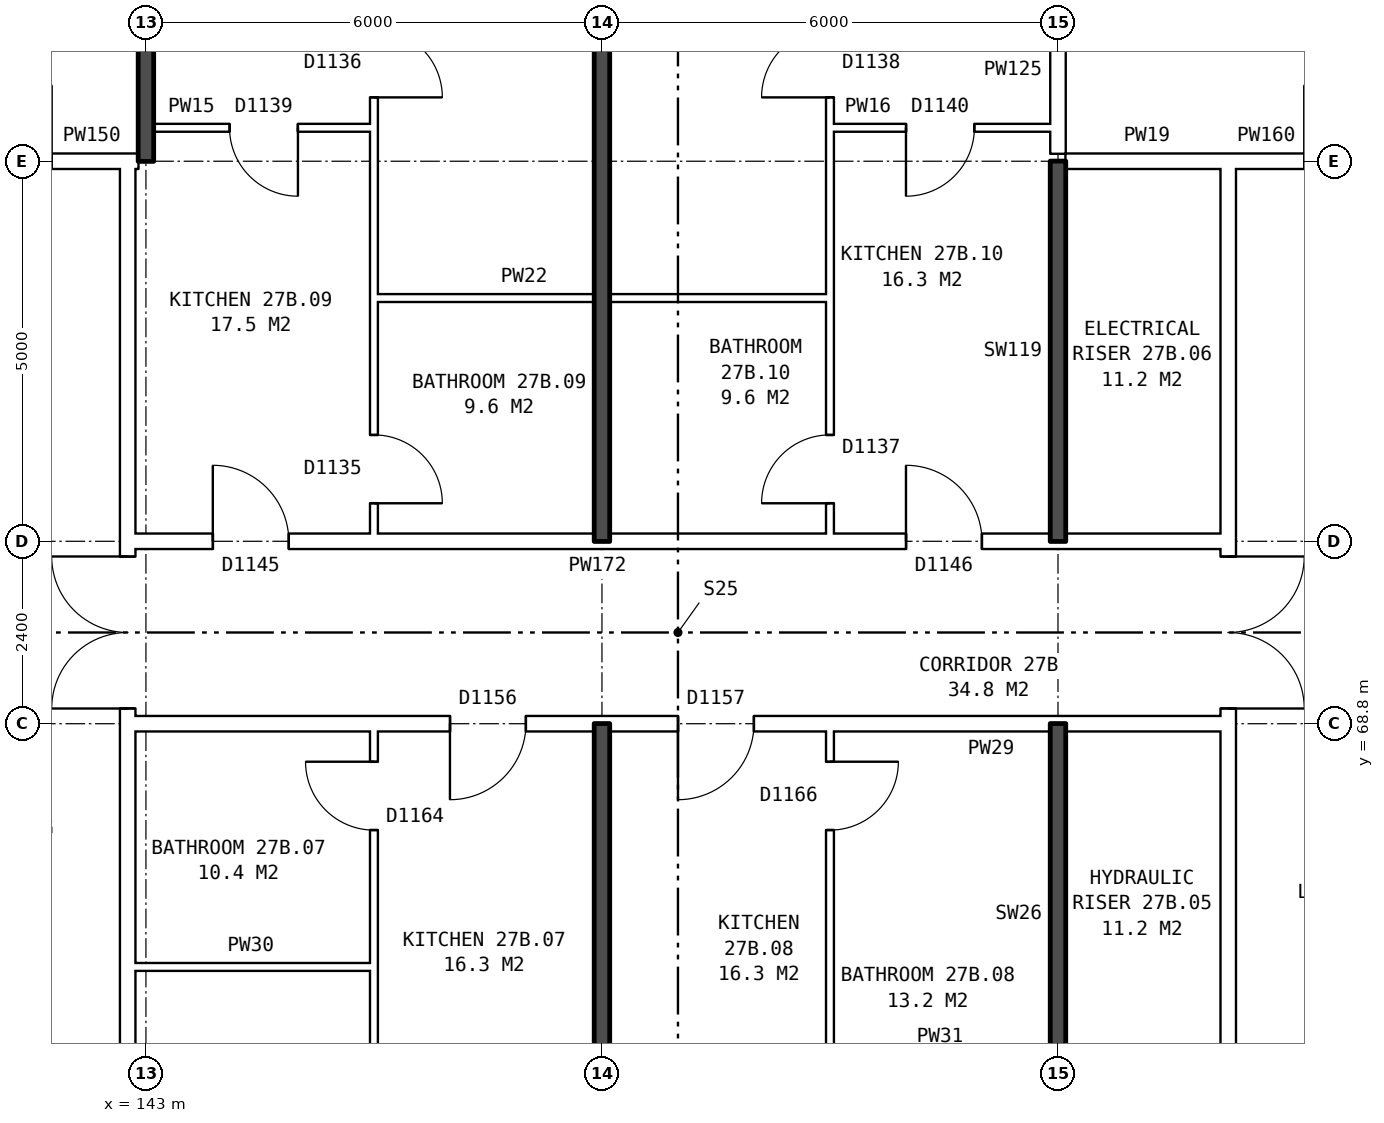
"""IFC4 building model, lengths in metres.
Left out: names, types, materials, properties, quantities, classifications, styles, units other than length and angle.
Written with IfcOpenShell. Run it as: python <this file> out.ifc"""

import sys

from ifc_helpers import new_model, si_unit, direction, frame, frame_2d, origin, place, context, subcontext, project, spatial, rectangle, extrude, element, fill, save


model = new_model("IFC4")
c1 = context("Model", 3, precision=1e-05, world=origin(), true_north=direction((0.0, 1.0)))
c2 = subcontext(c1, "Body", "Model", "MODEL_VIEW")
j1 = project(units=[si_unit("LENGTHUNIT", "METRE"), si_unit("PLANEANGLEUNIT", "RADIAN")], contexts=[c1])
p1 = place(None, origin())
s1 = spatial("IfcSite", under=j1, at=p1, CompositionType="ELEMENT")
p2 = place(p1, origin())
s2 = spatial("IfcBuilding", under=s1, at=p2, CompositionType="ELEMENT")
p3 = place(p2, frame((0.0, 0.0, 99.5)))
s3 = spatial("IfcBuildingStorey", under=s2, at=p3, CompositionType="ELEMENT", Elevation=99.5)
p4 = place(p3, frame((142.76, 63.9, 0.0), z_axis=(0.0, 0.0, 1.0), x_axis=(0.0, 1.0, 0.0)))
e1 = element("IfcWall", 1, at=p4, inside=s3, PredefinedType="PARTITIONING", context=c2, shape_type="SweptSolid", body=[
    extrude(rectangle(XDim=12.2, YDim=0.2, at=frame_2d((6.1, 0.0))), origin(), (0.0, 0.0, 1.0), 2.85),
])
p5 = place(p4, frame((5.1, 0.0, 0.0)))
e2 = element("IfcOpeningElement", 2, at=p5, cuts=e1, PredefinedType="OPENING", context=c2, shape_type="SweptSolid", body=[
    extrude(rectangle(XDim=2.0, YDim=2.1, at=frame_2d((1.0, 1.05))), frame((0.0, 0.11, 0.0), z_axis=(0.0, -1.0, 0.0), x_axis=(1.0, 0.0, 0.0)), (0.0, 0.0, 1.0), 0.22),
])
p6 = place(p3, frame((157.24, 63.9, 0.0), z_axis=(0.0, 0.0, 1.0), x_axis=(0.0, 1.0, 0.0)))
e3 = element("IfcWall", 3, at=p6, inside=s3, PredefinedType="PARTITIONING", context=c2, shape_type="SweptSolid", body=[
    extrude(rectangle(XDim=12.2, YDim=0.2, at=frame_2d((6.1, 0.0))), origin(), (0.0, 0.0, 1.0), 2.85),
])
p7 = place(p6, frame((5.1, 0.0, 0.0)))
e4 = element("IfcOpeningElement", 4, at=p7, cuts=e3, PredefinedType="OPENING", context=c2, shape_type="SweptSolid", body=[
    extrude(rectangle(XDim=2.0, YDim=2.1, at=frame_2d((1.0, 1.05))), frame((0.0, 0.11, 0.0), z_axis=(0.0, -1.0, 0.0), x_axis=(1.0, 0.0, 0.0)), (0.0, 0.0, 1.0), 0.22),
])
p8 = place(p3, frame((142.76, 65.6, 0.0), z_axis=(0.0, 0.0, 1.0), x_axis=(1.0, 0.0, 0.0)))
e5 = element("IfcWall", 5, at=p8, inside=s3, PredefinedType="PARTITIONING", context=c2, shape_type="SweptSolid", body=[
    extrude(rectangle(XDim=3.24, YDim=0.1, at=frame_2d((1.62, 0.0))), origin(), (0.0, 0.0, 1.0), 2.85),
])
p9 = place(p3, frame((142.76, 68.8, 0.0), z_axis=(0.0, 0.0, 1.0), x_axis=(1.0, 0.0, 0.0)))
e6 = element("IfcWall", 6, at=p9, inside=s3, PredefinedType="PARTITIONING", context=c2, shape_type="SweptSolid", body=[
    extrude(rectangle(XDim=14.48, YDim=0.2, at=frame_2d((7.24, 0.0))), origin(), (0.0, 0.0, 1.0), 2.85),
])
p10 = place(p9, frame((4.24, 0.0, 0.0)))
e7 = element("IfcOpeningElement", 7, at=p10, cuts=e6, PredefinedType="OPENING", context=c2, shape_type="SweptSolid", body=[
    extrude(rectangle(XDim=1.0, YDim=2.1, at=frame_2d((0.5, 1.05))), frame((0.0, 0.11, 0.0), z_axis=(0.0, -1.0, 0.0), x_axis=(1.0, 0.0, 0.0)), (0.0, 0.0, 1.0), 0.22),
])
p11 = place(p9, frame((7.24, 0.0, 0.0)))
e8 = element("IfcOpeningElement", 8, at=p11, cuts=e6, PredefinedType="OPENING", context=c2, shape_type="SweptSolid", body=[
    extrude(rectangle(XDim=1.0, YDim=2.1, at=frame_2d((0.5, 1.05))), frame((0.0, 0.11, 0.0), z_axis=(0.0, -1.0, 0.0), x_axis=(1.0, 0.0, 0.0)), (0.0, 0.0, 1.0), 0.22),
])
p12 = place(p3, frame((142.76, 71.2, 0.0), z_axis=(0.0, 0.0, 1.0), x_axis=(1.0, 0.0, 0.0)))
e9 = element("IfcWall", 9, at=p12, inside=s3, PredefinedType="PARTITIONING", context=c2, shape_type="SweptSolid", body=[
    extrude(rectangle(XDim=14.48, YDim=0.2, at=frame_2d((7.24, 0.0))), origin(), (0.0, 0.0, 1.0), 2.85),
])
p13 = place(p12, frame((1.12, 0.0, 0.0)))
e10 = element("IfcOpeningElement", 10, at=p13, cuts=e9, PredefinedType="OPENING", context=c2, shape_type="SweptSolid", body=[
    extrude(rectangle(XDim=1.0, YDim=2.1, at=frame_2d((0.5, 1.05))), frame((0.0, 0.11, 0.0), z_axis=(0.0, -1.0, 0.0), x_axis=(1.0, 0.0, 0.0)), (0.0, 0.0, 1.0), 0.22),
])
p14 = place(p12, frame((10.24, 0.0, 0.0)))
e11 = element("IfcOpeningElement", 11, at=p14, cuts=e9, PredefinedType="OPENING", context=c2, shape_type="SweptSolid", body=[
    extrude(rectangle(XDim=1.0, YDim=2.1, at=frame_2d((0.5, 1.05))), frame((0.0, 0.11, 0.0), z_axis=(0.0, -1.0, 0.0), x_axis=(1.0, 0.0, 0.0)), (0.0, 0.0, 1.0), 0.22),
])
p15 = place(p3, frame((146.0, 74.4, 0.0), z_axis=(0.0, 0.0, 1.0), x_axis=(1.0, 0.0, 0.0)))
e12 = element("IfcWall", 12, at=p15, inside=s3, PredefinedType="PARTITIONING", context=c2, shape_type="SweptSolid", body=[
    extrude(rectangle(XDim=6.0, YDim=0.1, at=frame_2d((3.0, 0.0))), origin(), (0.0, 0.0, 1.0), 2.85),
])
p16 = place(p3, frame((139.76, 76.2, 0.0), z_axis=(0.0, 0.0, 1.0), x_axis=(1.0, 0.0, 0.0)))
e13 = element("IfcWall", 13, at=p16, inside=s3, PredefinedType="PARTITIONING", context=c2, shape_type="SweptSolid", body=[
    extrude(rectangle(XDim=3.0, YDim=0.2, at=frame_2d((1.5, 0.0))), origin(), (0.0, 0.0, 1.0), 2.85),
])
p17 = place(p16, frame((1.0, 0.0, 0.0)))
e14 = element("IfcOpeningElement", 14, at=p17, cuts=e13, PredefinedType="OPENING", context=c2, shape_type="SweptSolid", body=[
    extrude(rectangle(XDim=1.0, YDim=2.1, at=frame_2d((0.5, 1.05))), frame((0.0, 0.11, 0.0), z_axis=(0.0, -1.0, 0.0), x_axis=(1.0, 0.0, 0.0)), (0.0, 0.0, 1.0), 0.22),
])
p18 = place(p3, frame((142.76, 76.2, 0.0), z_axis=(0.0, 0.0, 1.0), x_axis=(1.0, 0.0, 0.0)))
e15 = element("IfcWall", 15, at=p18, inside=s3, PredefinedType="PARTITIONING", context=c2, shape_type="SweptSolid", body=[
    extrude(rectangle(XDim=0.14, YDim=0.2, at=frame_2d((0.07, 0.0))), origin(), (0.0, 0.0, 1.0), 2.85),
])
p19 = place(p3, frame((155.1, 76.2, 0.0), z_axis=(0.0, 0.0, 1.0), x_axis=(1.0, 0.0, 0.0)))
e16 = element("IfcWall", 16, at=p19, inside=s3, PredefinedType="PARTITIONING", context=c2, shape_type="SweptSolid", body=[
    extrude(rectangle(XDim=2.14, YDim=0.2, at=frame_2d((1.07, 0.0))), origin(), (0.0, 0.0, 1.0), 2.85),
])
p20 = place(p3, frame((157.24, 76.2, 0.0), z_axis=(0.0, 0.0, 1.0), x_axis=(1.0, 0.0, 0.0)))
e17 = element("IfcWall", 17, at=p20, inside=s3, PredefinedType="PARTITIONING", context=c2, shape_type="SweptSolid", body=[
    extrude(rectangle(XDim=3.0, YDim=0.2, at=frame_2d((1.5, 0.0))), origin(), (0.0, 0.0, 1.0), 2.85),
])
p21 = place(p20, frame((1.0, 0.0, 0.0)))
e18 = element("IfcOpeningElement", 18, at=p21, cuts=e17, PredefinedType="OPENING", context=c2, shape_type="SweptSolid", body=[
    extrude(rectangle(XDim=1.0, YDim=2.1, at=frame_2d((0.5, 1.05))), frame((0.0, 0.11, 0.0), z_axis=(0.0, -1.0, 0.0), x_axis=(1.0, 0.0, 0.0)), (0.0, 0.0, 1.0), 0.22),
])
p22 = place(p3, frame((143.1, 76.64, 0.0), z_axis=(0.0, 0.0, 1.0), x_axis=(1.0, 0.0, 0.0)))
e19 = element("IfcWall", 19, at=p22, inside=s3, PredefinedType="PARTITIONING", context=c2, shape_type="SweptSolid", body=[
    extrude(rectangle(XDim=2.9, YDim=0.1, at=frame_2d((1.45, 0.0))), origin(), (0.0, 0.0, 1.0), 2.85),
])
p23 = place(p22, frame((1.0, 0.0, 0.0)))
e20 = element("IfcOpeningElement", 20, at=p23, cuts=e19, PredefinedType="OPENING", context=c2, shape_type="SweptSolid", body=[
    extrude(rectangle(XDim=0.9, YDim=2.1, at=frame_2d((0.45, 1.05))), frame((0.0, 0.06, 0.0), z_axis=(0.0, -1.0, 0.0), x_axis=(1.0, 0.0, 0.0)), (0.0, 0.0, 1.0), 0.12),
])
p24 = place(p3, frame((152.0, 76.64, 0.0), z_axis=(0.0, 0.0, 1.0), x_axis=(1.0, 0.0, 0.0)))
e21 = element("IfcWall", 21, at=p24, inside=s3, PredefinedType="PARTITIONING", context=c2, shape_type="SweptSolid", body=[
    extrude(rectangle(XDim=2.9, YDim=0.1, at=frame_2d((1.45, 0.0))), origin(), (0.0, 0.0, 1.0), 2.85),
])
p25 = place(p24, frame((1.0, 0.0, 0.0)))
e22 = element("IfcOpeningElement", 22, at=p25, cuts=e21, PredefinedType="OPENING", context=c2, shape_type="SweptSolid", body=[
    extrude(rectangle(XDim=0.9, YDim=2.1, at=frame_2d((0.45, 1.05))), frame((0.0, 0.06, 0.0), z_axis=(0.0, -1.0, 0.0), x_axis=(1.0, 0.0, 0.0)), (0.0, 0.0, 1.0), 0.12),
])
p26 = place(p3, frame((143.0, 76.2, 0.0), z_axis=(0.0, 0.0, 1.0), x_axis=(0.0, 1.0, 0.0)))
e23 = element("IfcWall", 23, at=p26, inside=s3, PredefinedType="SOLIDWALL", context=c2, shape_type="SweptSolid", body=[
    extrude(rectangle(XDim=9.44, YDim=0.2, at=frame_2d((4.72, 0.0))), origin(), (0.0, 0.0, 1.0), 2.85),
])
p27 = place(p3, frame((146.0, 54.36, 0.0), z_axis=(0.0, 0.0, 1.0), x_axis=(0.0, 1.0, 0.0)))
e24 = element("IfcWall", 24, at=p27, inside=s3, PredefinedType="PARTITIONING", context=c2, shape_type="SweptSolid", body=[
    extrude(rectangle(XDim=14.34, YDim=0.1, at=frame_2d((7.17, 0.0))), origin(), (0.0, 0.0, 1.0), 2.85),
])
p28 = place(p27, frame((7.7, 0.0, 0.0)))
e25 = element("IfcOpeningElement", 25, at=p28, cuts=e24, PredefinedType="OPENING", context=c2, shape_type="SweptSolid", body=[
    extrude(rectangle(XDim=0.9, YDim=2.1, at=frame_2d((0.45, 1.05))), frame((0.0, 0.06, 0.0), z_axis=(0.0, -1.0, 0.0), x_axis=(1.0, 0.0, 0.0)), (0.0, 0.0, 1.0), 0.12),
])
p29 = place(p27, frame((13.04, 0.0, 0.0)))
e26 = element("IfcOpeningElement", 26, at=p29, cuts=e24, PredefinedType="OPENING", context=c2, shape_type="SweptSolid", body=[
    extrude(rectangle(XDim=0.9, YDim=2.1, at=frame_2d((0.45, 1.05))), frame((0.0, 0.06, 0.0), z_axis=(0.0, -1.0, 0.0), x_axis=(1.0, 0.0, 0.0)), (0.0, 0.0, 1.0), 0.12),
])
p30 = place(p3, frame((146.0, 71.3, 0.0), z_axis=(0.0, 0.0, 1.0), x_axis=(0.0, 1.0, 0.0)))
e27 = element("IfcWall", 27, at=p30, inside=s3, PredefinedType="PARTITIONING", context=c2, shape_type="SweptSolid", body=[
    extrude(rectangle(XDim=14.34, YDim=0.1, at=frame_2d((7.17, 0.0))), origin(), (0.0, 0.0, 1.0), 2.85),
])
p31 = place(p30, frame((5.74, 0.0, 0.0)))
e28 = element("IfcOpeningElement", 28, at=p31, cuts=e27, PredefinedType="OPENING", context=c2, shape_type="SweptSolid", body=[
    extrude(rectangle(XDim=0.9, YDim=2.1, at=frame_2d((0.45, 1.05))), frame((0.0, 0.06, 0.0), z_axis=(0.0, -1.0, 0.0), x_axis=(1.0, 0.0, 0.0)), (0.0, 0.0, 1.0), 0.12),
])
p32 = place(p30, frame((0.4, 0.0, 0.0)))
e29 = element("IfcOpeningElement", 29, at=p32, cuts=e27, PredefinedType="OPENING", context=c2, shape_type="SweptSolid", body=[
    extrude(rectangle(XDim=0.9, YDim=2.1, at=frame_2d((0.45, 1.05))), frame((0.0, 0.06, 0.0), z_axis=(0.0, -1.0, 0.0), x_axis=(1.0, 0.0, 0.0)), (0.0, 0.0, 1.0), 0.12),
])
for number, where, z_axis, x_axis in (
    (30, (149.0, 54.36, 0.0), (0.0, 0.0, 1.0), (0.0, 1.0, 0.0)),
    (31, (149.0, 71.2, 0.0), (0.0, 0.0, 1.0), (0.0, 1.0, 0.0)),
):
    element("IfcWall", number, at=place(p3, frame(where, z_axis=z_axis, x_axis=x_axis)), inside=s3, PredefinedType="SOLIDWALL", context=c2, shape_type="SweptSolid", body=[
        extrude(rectangle(XDim=14.44, YDim=0.2, at=frame_2d((7.22, 0.0))), origin(), (0.0, 0.0, 1.0), 2.85),
    ])
p33 = place(p3, frame((152.0, 54.36, 0.0), z_axis=(0.0, 0.0, 1.0), x_axis=(0.0, 1.0, 0.0)))
e32 = element("IfcWall", 32, at=p33, inside=s3, PredefinedType="PARTITIONING", context=c2, shape_type="SweptSolid", body=[
    extrude(rectangle(XDim=14.34, YDim=0.1, at=frame_2d((7.17, 0.0))), origin(), (0.0, 0.0, 1.0), 2.85),
])
p34 = place(p33, frame((7.7, 0.0, 0.0)))
e33 = element("IfcOpeningElement", 33, at=p34, cuts=e32, PredefinedType="OPENING", context=c2, shape_type="SweptSolid", body=[
    extrude(rectangle(XDim=0.9, YDim=2.1, at=frame_2d((0.45, 1.05))), frame((0.0, 0.06, 0.0), z_axis=(0.0, -1.0, 0.0), x_axis=(1.0, 0.0, 0.0)), (0.0, 0.0, 1.0), 0.12),
])
p35 = place(p33, frame((13.04, 0.0, 0.0)))
e34 = element("IfcOpeningElement", 34, at=p35, cuts=e32, PredefinedType="OPENING", context=c2, shape_type="SweptSolid", body=[
    extrude(rectangle(XDim=0.9, YDim=2.1, at=frame_2d((0.45, 1.05))), frame((0.0, 0.06, 0.0), z_axis=(0.0, -1.0, 0.0), x_axis=(1.0, 0.0, 0.0)), (0.0, 0.0, 1.0), 0.12),
])
p36 = place(p3, frame((152.0, 71.3, 0.0), z_axis=(0.0, 0.0, 1.0), x_axis=(0.0, 1.0, 0.0)))
e35 = element("IfcWall", 35, at=p36, inside=s3, PredefinedType="PARTITIONING", context=c2, shape_type="SweptSolid", body=[
    extrude(rectangle(XDim=14.34, YDim=0.1, at=frame_2d((7.17, 0.0))), origin(), (0.0, 0.0, 1.0), 2.85),
])
p37 = place(p36, frame((5.74, 0.0, 0.0)))
e36 = element("IfcOpeningElement", 36, at=p37, cuts=e35, PredefinedType="OPENING", context=c2, shape_type="SweptSolid", body=[
    extrude(rectangle(XDim=0.9, YDim=2.1, at=frame_2d((0.45, 1.05))), frame((0.0, 0.06, 0.0), z_axis=(0.0, -1.0, 0.0), x_axis=(1.0, 0.0, 0.0)), (0.0, 0.0, 1.0), 0.12),
])
p38 = place(p36, frame((0.4, 0.0, 0.0)))
e37 = element("IfcOpeningElement", 37, at=p38, cuts=e35, PredefinedType="OPENING", context=c2, shape_type="SweptSolid", body=[
    extrude(rectangle(XDim=0.9, YDim=2.1, at=frame_2d((0.45, 1.05))), frame((0.0, 0.06, 0.0), z_axis=(0.0, -1.0, 0.0), x_axis=(1.0, 0.0, 0.0)), (0.0, 0.0, 1.0), 0.12),
])
for number, where, z_axis, x_axis in (
    (38, (155.0, 63.8, 0.0), (0.0, 0.0, 1.0), (0.0, 1.0, 0.0)),
    (39, (155.0, 71.2, 0.0), (0.0, 0.0, 1.0), (0.0, 1.0, 0.0)),
):
    element("IfcWall", number, at=place(p3, frame(where, z_axis=z_axis, x_axis=x_axis)), inside=s3, PredefinedType="SOLIDWALL", context=c2, shape_type="SweptSolid", body=[
        extrude(rectangle(XDim=5.0, YDim=0.2, at=frame_2d((2.5, 0.0))), origin(), (0.0, 0.0, 1.0), 2.85),
    ])
p39 = place(p3, frame((155.0, 76.3, 0.0), z_axis=(0.0, 0.0, 1.0), x_axis=(0.0, 1.0, 0.0)))
e40 = element("IfcWall", 40, at=p39, inside=s3, PredefinedType="PARTITIONING", context=c2, shape_type="SweptSolid", body=[
    extrude(rectangle(XDim=2.2, YDim=0.2, at=frame_2d((1.1, 0.0))), origin(), (0.0, 0.0, 1.0), 2.85),
])
p40 = place(p5, origin())
e41 = element("IfcDoor", 41, at=p40, inside=s3, OperationType="DOUBLE_DOOR_SINGLE_SWING", PredefinedType="DOOR", context=c2, shape_type="SweptSolid", body=[
    extrude(rectangle(XDim=2.0, YDim=2.1, at=frame_2d((1.0, 1.05))), frame((0.0, 0.025, 0.0), z_axis=(0.0, -1.0, 0.0), x_axis=(1.0, 0.0, 0.0)), (0.0, 0.0, 1.0), 0.05),
])
fill(e2, e41)
p41 = place(p7, frame((2.0, 0.0, 0.0), z_axis=(0.0, 0.0, 1.0), x_axis=(-1.0, 0.0, 0.0)))
e42 = element("IfcDoor", 42, at=p41, inside=s3, OperationType="DOUBLE_DOOR_SINGLE_SWING", PredefinedType="DOOR", context=c2, shape_type="SweptSolid", body=[
    extrude(rectangle(XDim=2.0, YDim=2.1, at=frame_2d((1.0, 1.05))), frame((0.0, 0.025, 0.0), z_axis=(0.0, -1.0, 0.0), x_axis=(1.0, 0.0, 0.0)), (0.0, 0.0, 1.0), 0.05),
])
fill(e4, e42)
p42 = place(p10, frame((1.0, 0.0, 0.0), z_axis=(0.0, 0.0, 1.0), x_axis=(-1.0, 0.0, 0.0)))
e43 = element("IfcDoor", 43, at=p42, inside=s3, OperationType="SINGLE_SWING_RIGHT", PredefinedType="DOOR", context=c2, shape_type="SweptSolid", body=[
    extrude(rectangle(XDim=1.0, YDim=2.1, at=frame_2d((0.5, 1.05))), frame((0.0, 0.025, 0.0), z_axis=(0.0, -1.0, 0.0), x_axis=(1.0, 0.0, 0.0)), (0.0, 0.0, 1.0), 0.05),
])
fill(e7, e43)
p43 = place(p29, origin())
e44 = element("IfcDoor", 44, at=p43, inside=s3, OperationType="SINGLE_SWING_RIGHT", PredefinedType="DOOR", context=c2, shape_type="SweptSolid", body=[
    extrude(rectangle(XDim=0.9, YDim=2.1, at=frame_2d((0.45, 1.05))), frame((0.0, 0.025, 0.0), z_axis=(0.0, -1.0, 0.0), x_axis=(1.0, 0.0, 0.0)), (0.0, 0.0, 1.0), 0.05),
])
fill(e26, e44)
p44 = place(p11, frame((1.0, 0.0, 0.0), z_axis=(0.0, 0.0, 1.0), x_axis=(-1.0, 0.0, 0.0)))
e45 = element("IfcDoor", 45, at=p44, inside=s3, OperationType="SINGLE_SWING_RIGHT", PredefinedType="DOOR", context=c2, shape_type="SweptSolid", body=[
    extrude(rectangle(XDim=1.0, YDim=2.1, at=frame_2d((0.5, 1.05))), frame((0.0, 0.025, 0.0), z_axis=(0.0, -1.0, 0.0), x_axis=(1.0, 0.0, 0.0)), (0.0, 0.0, 1.0), 0.05),
])
fill(e8, e45)
p45 = place(p35, frame((0.9, 0.0, 0.0), z_axis=(0.0, 0.0, 1.0), x_axis=(-1.0, 0.0, 0.0)))
e46 = element("IfcDoor", 46, at=p45, inside=s3, OperationType="SINGLE_SWING_LEFT", PredefinedType="DOOR", context=c2, shape_type="SweptSolid", body=[
    extrude(rectangle(XDim=0.9, YDim=2.1, at=frame_2d((0.45, 1.05))), frame((0.0, 0.025, 0.0), z_axis=(0.0, -1.0, 0.0), x_axis=(1.0, 0.0, 0.0)), (0.0, 0.0, 1.0), 0.05),
])
fill(e34, e46)
p46 = place(p31, frame((0.9, 0.0, 0.0), z_axis=(0.0, 0.0, 1.0), x_axis=(-1.0, 0.0, 0.0)))
e47 = element("IfcDoor", 47, at=p46, inside=s3, OperationType="SINGLE_SWING_RIGHT", PredefinedType="DOOR", context=c2, shape_type="SweptSolid", body=[
    extrude(rectangle(XDim=0.9, YDim=2.1, at=frame_2d((0.45, 1.05))), frame((0.0, 0.025, 0.0), z_axis=(0.0, -1.0, 0.0), x_axis=(1.0, 0.0, 0.0)), (0.0, 0.0, 1.0), 0.05),
])
fill(e28, e47)
p47 = place(p13, origin())
e48 = element("IfcDoor", 48, at=p47, inside=s3, OperationType="SINGLE_SWING_LEFT", PredefinedType="DOOR", context=c2, shape_type="SweptSolid", body=[
    extrude(rectangle(XDim=1.0, YDim=2.1, at=frame_2d((0.5, 1.05))), frame((0.0, 0.025, 0.0), z_axis=(0.0, -1.0, 0.0), x_axis=(1.0, 0.0, 0.0)), (0.0, 0.0, 1.0), 0.05),
])
fill(e10, e48)
p48 = place(p23, frame((0.9, 0.0, 0.0), z_axis=(0.0, 0.0, 1.0), x_axis=(-1.0, 0.0, 0.0)))
e49 = element("IfcDoor", 49, at=p48, inside=s3, OperationType="SINGLE_SWING_LEFT", PredefinedType="DOOR", context=c2, shape_type="SweptSolid", body=[
    extrude(rectangle(XDim=0.9, YDim=2.1, at=frame_2d((0.45, 1.05))), frame((0.0, 0.025, 0.0), z_axis=(0.0, -1.0, 0.0), x_axis=(1.0, 0.0, 0.0)), (0.0, 0.0, 1.0), 0.05),
])
fill(e20, e49)
p49 = place(p32, frame((0.9, 0.0, 0.0), z_axis=(0.0, 0.0, 1.0), x_axis=(-1.0, 0.0, 0.0)))
e50 = element("IfcDoor", 50, at=p49, inside=s3, OperationType="SINGLE_SWING_RIGHT", PredefinedType="DOOR", context=c2, shape_type="SweptSolid", body=[
    extrude(rectangle(XDim=0.9, YDim=2.1, at=frame_2d((0.45, 1.05))), frame((0.0, 0.025, 0.0), z_axis=(0.0, -1.0, 0.0), x_axis=(1.0, 0.0, 0.0)), (0.0, 0.0, 1.0), 0.05),
])
fill(e29, e50)
p50 = place(p37, origin())
e51 = element("IfcDoor", 51, at=p50, inside=s3, OperationType="SINGLE_SWING_LEFT", PredefinedType="DOOR", context=c2, shape_type="SweptSolid", body=[
    extrude(rectangle(XDim=0.9, YDim=2.1, at=frame_2d((0.45, 1.05))), frame((0.0, 0.025, 0.0), z_axis=(0.0, -1.0, 0.0), x_axis=(1.0, 0.0, 0.0)), (0.0, 0.0, 1.0), 0.05),
])
fill(e36, e51)
p51 = place(p14, origin())
e52 = element("IfcDoor", 52, at=p51, inside=s3, OperationType="SINGLE_SWING_LEFT", PredefinedType="DOOR", context=c2, shape_type="SweptSolid", body=[
    extrude(rectangle(XDim=1.0, YDim=2.1, at=frame_2d((0.5, 1.05))), frame((0.0, 0.025, 0.0), z_axis=(0.0, -1.0, 0.0), x_axis=(1.0, 0.0, 0.0)), (0.0, 0.0, 1.0), 0.05),
])
fill(e11, e52)
p52 = place(p25, frame((0.9, 0.0, 0.0), z_axis=(0.0, 0.0, 1.0), x_axis=(-1.0, 0.0, 0.0)))
e53 = element("IfcDoor", 53, at=p52, inside=s3, OperationType="SINGLE_SWING_RIGHT", PredefinedType="DOOR", context=c2, shape_type="SweptSolid", body=[
    extrude(rectangle(XDim=0.9, YDim=2.1, at=frame_2d((0.45, 1.05))), frame((0.0, 0.025, 0.0), z_axis=(0.0, -1.0, 0.0), x_axis=(1.0, 0.0, 0.0)), (0.0, 0.0, 1.0), 0.05),
])
fill(e22, e53)
p53 = place(p38, origin())
e54 = element("IfcDoor", 54, at=p53, inside=s3, OperationType="SINGLE_SWING_LEFT", PredefinedType="DOOR", context=c2, shape_type="SweptSolid", body=[
    extrude(rectangle(XDim=0.9, YDim=2.1, at=frame_2d((0.45, 1.05))), frame((0.0, 0.025, 0.0), z_axis=(0.0, -1.0, 0.0), x_axis=(1.0, 0.0, 0.0)), (0.0, 0.0, 1.0), 0.05),
])
fill(e37, e54)
save(model, sys.argv[1])
